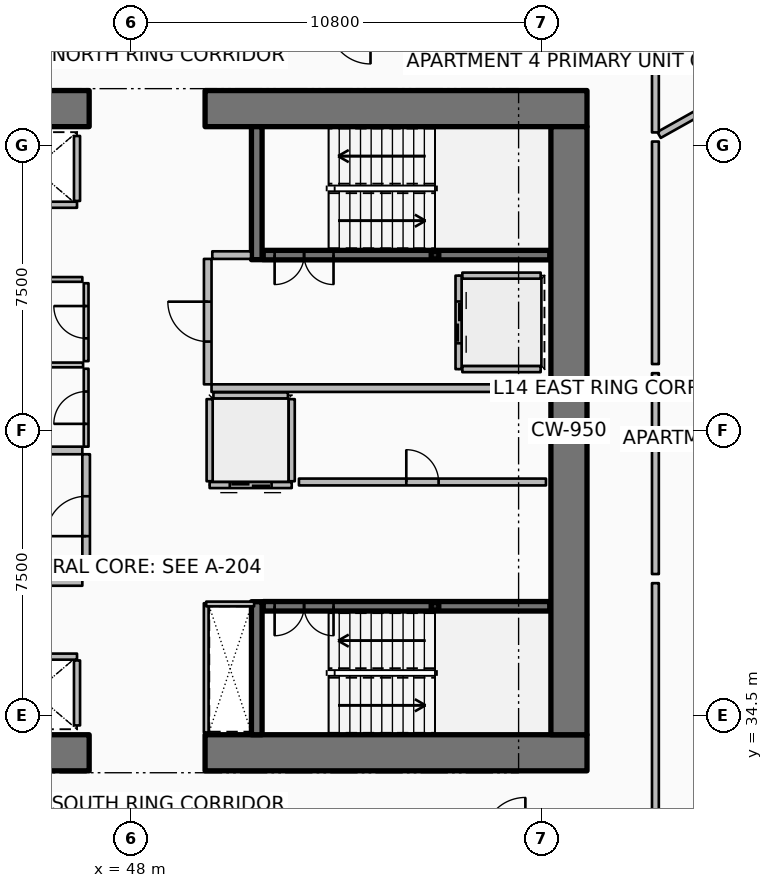
"""IFC4 building model, lengths in metres.
Left out: names, types, materials, properties, quantities, classifications, styles, units other than length and angle.
Written with IfcOpenShell. Run it as: python <this file> out.ifc"""

import sys

from ifc_helpers import new_model, si_unit, direction, frame, frame_2d, origin, origin_2d, place, context, subcontext, project, spatial, rectangle, hollow_rectangle, extrude, element, fill, save


model = new_model("IFC4")
c1 = context("Model", 3, precision=1e-05, world=origin(), true_north=direction((0.0, 1.0)))
c2 = subcontext(c1, "Body", "Model", "MODEL_VIEW")
j1 = project(units=[si_unit("LENGTHUNIT", "METRE"), si_unit("PLANEANGLEUNIT", "RADIAN")], contexts=[c1])
p1 = place(None, origin())
s1 = spatial("IfcSite", under=j1, at=p1, CompositionType="ELEMENT")
p2 = place(p1, origin())
s2 = spatial("IfcBuilding", under=s1, at=p2, CompositionType="ELEMENT")
p3 = place(p2, frame((0.0, 0.0, 60.15)))
s3 = spatial("IfcBuildingStorey", under=s2, at=p3, CompositionType="ELEMENT", Elevation=60.15)
p4 = place(p3, frame((36.85, 33.525, 0.0), z_axis=(0.0, 0.0, 1.0), x_axis=(1.0, 0.0, 0.0)))
e1 = element("IfcWall", 1, at=p4, inside=s3, PredefinedType="SHEAR", context=c2, shape_type="SweptSolid", body=[
    extrude(rectangle(XDim=10.05, YDim=0.95, at=frame_2d((5.025, 0.0))), origin(), (0.0, 0.0, 1.0), 3.75),
])
p5 = place(p3, frame((49.95, 33.525, 0.0), z_axis=(0.0, 0.0, 1.0), x_axis=(1.0, 0.0, 0.0)))
e2 = element("IfcWall", 2, at=p5, inside=s3, PredefinedType="SHEAR", context=c2, shape_type="SweptSolid", body=[
    extrude(rectangle(XDim=10.05, YDim=0.95, at=frame_2d((5.025, 0.0))), origin(), (0.0, 0.0, 1.0), 3.75),
])
p6 = place(p3, frame((36.85, 50.475, 0.0), z_axis=(0.0, 0.0, 1.0), x_axis=(1.0, 0.0, 0.0)))
e3 = element("IfcWall", 3, at=p6, inside=s3, PredefinedType="SHEAR", context=c2, shape_type="SweptSolid", body=[
    extrude(rectangle(XDim=10.05, YDim=0.95, at=frame_2d((5.025, 0.0))), origin(), (0.0, 0.0, 1.0), 3.75),
])
p7 = place(p3, frame((49.95, 50.475, 0.0), z_axis=(0.0, 0.0, 1.0), x_axis=(1.0, 0.0, 0.0)))
e4 = element("IfcWall", 4, at=p7, inside=s3, PredefinedType="SHEAR", context=c2, shape_type="SweptSolid", body=[
    extrude(rectangle(XDim=10.05, YDim=0.95, at=frame_2d((5.025, 0.0))), origin(), (0.0, 0.0, 1.0), 3.75),
])
p8 = place(p3, frame((59.525, 34.0, 0.0), z_axis=(0.0, 0.0, 1.0), x_axis=(0.0, 1.0, 0.0)))
e5 = element("IfcWall", 5, at=p8, inside=s3, PredefinedType="SHEAR", context=c2, shape_type="SweptSolid", body=[
    extrude(rectangle(XDim=16.0, YDim=0.95, at=frame_2d((8.0, 0.0))), origin(), (0.0, 0.0, 1.0), 3.75),
])
for number, where, z_axis, x_axis in (
    (6, (51.31, 46.5, 0.0), (0.0, 0.0, 1.0), (0.0, 1.0, 0.0)),
    (7, (51.31, 34.0, 0.0), (0.0, 0.0, 1.0), (0.0, 1.0, 0.0)),
):
    element("IfcWall", number, at=place(p3, frame(where, z_axis=z_axis, x_axis=x_axis)), inside=s3, PredefinedType="SHEAR", context=c2, shape_type="SweptSolid", body=[
        extrude(rectangle(XDim=3.5, YDim=0.28, at=frame_2d((1.75, 0.0))), origin(), (0.0, 0.0, 1.0), 3.75),
    ])
for number, where, z_axis, x_axis in (
    (8, (56.0, 46.62, 0.0), (0.0, 0.0, 1.0), (1.0, 0.0, 0.0)),
    (9, (56.0, 37.38, 0.0), (0.0, 0.0, 1.0), (1.0, 0.0, 0.0)),
):
    element("IfcColumn", number, at=place(p3, frame(where, z_axis=z_axis, x_axis=x_axis)), inside=s3, PredefinedType="COLUMN", context=c2, shape_type="SweptSolid", body=[
        extrude(hollow_rectangle(XDim=0.2, YDim=0.2, WallThickness=0.01, InnerFilletRadius=0.01, OuterFilletRadius=0.02, at=origin_2d()), origin(), (0.0, 0.0, 1.0), 1.67),
    ])
p9 = place(p3, frame((51.48, 46.62, 0.0), z_axis=(0.0, 0.0, 1.0), x_axis=(1.0, 0.0, 0.0)))
e10 = element("IfcWall", 10, at=p9, inside=s3, PredefinedType="SOLIDWALL", context=c2, shape_type="SweptSolid", body=[
    extrude(rectangle(XDim=7.54, YDim=0.25, at=frame_2d((3.77, 0.0))), origin(), (0.0, 0.0, 1.0), 3.5),
])
p10 = place(p9, frame((0.3, 0.0, 0.0)))
e11 = element("IfcOpeningElement", 11, at=p10, cuts=e10, PredefinedType="OPENING", context=c2, shape_type="SweptSolid", body=[
    extrude(rectangle(XDim=1.55, YDim=2.15, at=frame_2d((0.775, 1.075))), frame((0.0, 0.135, 0.0), z_axis=(0.0, -1.0, 0.0), x_axis=(1.0, 0.0, 0.0)), (0.0, 0.0, 1.0), 0.27),
])
p11 = place(p3, frame((51.48, 37.38, 0.0), z_axis=(0.0, 0.0, 1.0), x_axis=(1.0, 0.0, 0.0)))
e12 = element("IfcWall", 12, at=p11, inside=s3, PredefinedType="SOLIDWALL", context=c2, shape_type="SweptSolid", body=[
    extrude(rectangle(XDim=7.54, YDim=0.25, at=frame_2d((3.77, 0.0))), origin(), (0.0, 0.0, 1.0), 3.5),
])
p12 = place(p11, frame((0.3, 0.0, 0.0)))
e13 = element("IfcOpeningElement", 13, at=p12, cuts=e12, PredefinedType="OPENING", context=c2, shape_type="SweptSolid", body=[
    extrude(rectangle(XDim=1.55, YDim=2.15, at=frame_2d((0.775, 1.075))), frame((0.0, 0.135, 0.0), z_axis=(0.0, -1.0, 0.0), x_axis=(1.0, 0.0, 0.0)), (0.0, 0.0, 1.0), 0.27),
])
p13 = place(p3, frame((46.58, 47.945, 0.0), z_axis=(0.0, 0.0, 1.0), x_axis=(-1.0, 0.0, 0.0)))
e14 = element("IfcWall", 14, at=p13, inside=s3, PredefinedType="PARTITIONING", context=c2, shape_type="SweptSolid", body=[
    extrude(rectangle(XDim=2.26, YDim=0.16, at=frame_2d((1.13, 0.0))), origin(), (0.0, 0.0, 1.0), 3.5),
])
p14 = place(p3, frame((46.58, 48.045, 0.0), z_axis=(0.0, 0.0, 1.0), x_axis=(0.0, 1.0, 0.0)))
e15 = element("IfcWall", 15, at=p14, inside=s3, PredefinedType="PARTITIONING", context=c2, shape_type="SweptSolid", body=[
    extrude(rectangle(XDim=1.71, YDim=0.16, at=frame_2d((0.855, 0.0))), origin(), (0.0, 0.0, 1.0), 3.5),
])
p15 = place(p3, frame((44.32, 36.055, 0.0), z_axis=(0.0, 0.0, 1.0), x_axis=(1.0, 0.0, 0.0)))
e16 = element("IfcWall", 16, at=p15, inside=s3, PredefinedType="PARTITIONING", context=c2, shape_type="SweptSolid", body=[
    extrude(rectangle(XDim=2.26, YDim=0.16, at=frame_2d((1.13, 0.0))), origin(), (0.0, 0.0, 1.0), 3.5),
])
p16 = place(p3, frame((46.58, 34.245, 0.0), z_axis=(0.0, 0.0, 1.0), x_axis=(0.0, 1.0, 0.0)))
e17 = element("IfcWall", 17, at=p16, inside=s3, PredefinedType="PARTITIONING", context=c2, shape_type="SweptSolid", body=[
    extrude(rectangle(XDim=1.71, YDim=0.16, at=frame_2d((0.855, 0.0))), origin(), (0.0, 0.0, 1.0), 3.5),
])
p17 = place(p3, frame((56.62, 46.08, 0.0), z_axis=(0.0, 0.0, 1.0), x_axis=(0.0, -1.0, 0.0)))
e18 = element("IfcWall", 18, at=p17, inside=s3, PredefinedType="PARTITIONING", context=c2, shape_type="SweptSolid", body=[
    extrude(rectangle(XDim=2.46, YDim=0.16, at=frame_2d((1.23, 0.0))), origin(), (0.0, 0.0, 1.0), 3.5),
])
p18 = place(p17, frame((0.68, 0.0, 0.0)))
e19 = element("IfcOpeningElement", 19, at=p18, cuts=e18, PredefinedType="OPENING", context=c2, shape_type="SweptSolid", body=[
    extrude(rectangle(XDim=1.1, YDim=2.1, at=frame_2d((0.55, 1.05))), frame((0.0, 0.09, 0.0), z_axis=(0.0, -1.0, 0.0), x_axis=(1.0, 0.0, 0.0)), (0.0, 0.0, 1.0), 0.18),
])
for number, where, z_axis, x_axis in (
    (20, (56.72, 46.08, 0.0), (0.0, 0.0, 1.0), (1.0, 0.0, 0.0)),
    (21, (56.72, 43.62, 0.0), (0.0, 0.0, 1.0), (1.0, 0.0, 0.0)),
):
    element("IfcWall", number, at=place(p3, frame(where, z_axis=z_axis, x_axis=x_axis)), inside=s3, PredefinedType="PARTITIONING", context=c2, shape_type="SweptSolid", body=[
        extrude(rectangle(XDim=2.06, YDim=0.16, at=frame_2d((1.03, 0.0))), origin(), (0.0, 0.0, 1.0), 3.5),
    ])
p19 = place(p3, frame((52.23, 40.57, 0.0), z_axis=(0.0, 0.0, 1.0), x_axis=(-1.0, 0.0, 0.0)))
e22 = element("IfcWall", 22, at=p19, inside=s3, PredefinedType="PARTITIONING", context=c2, shape_type="SweptSolid", body=[
    extrude(rectangle(XDim=2.16, YDim=0.16, at=frame_2d((1.08, 0.0))), origin(), (0.0, 0.0, 1.0), 3.5),
])
p20 = place(p19, frame((0.53, 0.0, 0.0)))
e23 = element("IfcOpeningElement", 23, at=p20, cuts=e22, PredefinedType="OPENING", context=c2, shape_type="SweptSolid", body=[
    extrude(rectangle(XDim=1.1, YDim=2.1, at=frame_2d((0.55, 1.05))), frame((0.0, 0.09, 0.0), z_axis=(0.0, -1.0, 0.0), x_axis=(1.0, 0.0, 0.0)), (0.0, 0.0, 1.0), 0.18),
])
for number, where, z_axis, x_axis in (
    (24, (52.23, 40.67, 0.0), (0.0, 0.0, 1.0), (0.0, 1.0, 0.0)),
    (25, (50.07, 40.67, 0.0), (0.0, 0.0, 1.0), (0.0, 1.0, 0.0)),
):
    element("IfcWall", number, at=place(p3, frame(where, z_axis=z_axis, x_axis=x_axis)), inside=s3, PredefinedType="PARTITIONING", context=c2, shape_type="SweptSolid", body=[
        extrude(rectangle(XDim=2.16, YDim=0.16, at=frame_2d((1.08, 0.0))), origin(), (0.0, 0.0, 1.0), 3.5),
    ])
p21 = place(p3, frame((50.17, 42.93, 0.0), z_axis=(0.0, 0.0, 1.0), x_axis=(1.0, 0.0, 0.0)))
e26 = element("IfcWall", 26, at=p21, inside=s3, PredefinedType="PARTITIONING", context=c2, shape_type="SweptSolid", body=[
    extrude(rectangle(XDim=1.96, YDim=0.16, at=frame_2d((0.98, 0.0))), origin(), (0.0, 0.0, 1.0), 3.5),
])
p22 = place(p3, frame((52.42, 40.65, 0.0), z_axis=(0.0, 0.0, 1.0), x_axis=(1.0, 0.0, 0.0)))
e27 = element("IfcWall", 27, at=p22, inside=s3, PredefinedType="PARTITIONING", context=c2, shape_type="SweptSolid", body=[
    extrude(rectangle(XDim=6.5, YDim=0.18, at=frame_2d((3.25, 0.0))), origin(), (0.0, 0.0, 1.0), 3.5),
])
p23 = place(p22, frame((2.825, 0.0, 0.0)))
e28 = element("IfcOpeningElement", 28, at=p23, cuts=e27, PredefinedType="OPENING", context=c2, shape_type="SweptSolid", body=[
    extrude(rectangle(XDim=0.85, YDim=2.06, at=frame_2d((0.425, 1.03))), frame((0.0, 0.1, 0.0), z_axis=(0.0, -1.0, 0.0), x_axis=(1.0, 0.0, 0.0)), (0.0, 0.0, 1.0), 0.2),
])
p24 = place(p3, frame((41.35, 38.02, 0.0), z_axis=(0.0, 0.0, 1.0), x_axis=(1.0, 0.0, 0.0)))
e29 = element("IfcWall", 29, at=p24, inside=s3, PredefinedType="PARTITIONING", context=c2, shape_type="SweptSolid", body=[
    extrude(rectangle(XDim=5.37, YDim=0.2, at=frame_2d((2.685, 0.0))), origin(), (0.0, 0.0, 1.0), 3.5),
])
p25 = place(p3, frame((43.92, 41.48, 0.0), z_axis=(0.0, 0.0, 1.0), x_axis=(1.0, 0.0, 0.0)))
e30 = element("IfcWall", 30, at=p25, inside=s3, PredefinedType="PARTITIONING", context=c2, shape_type="SweptSolid", body=[
    extrude(rectangle(XDim=2.8, YDim=0.2, at=frame_2d((1.4, 0.0))), origin(), (0.0, 0.0, 1.0), 3.5),
])
p26 = place(p3, frame((46.82, 38.12, 0.0), z_axis=(0.0, 0.0, 1.0), x_axis=(0.0, 1.0, 0.0)))
e31 = element("IfcWall", 31, at=p26, inside=s3, PredefinedType="PARTITIONING", context=c2, shape_type="SweptSolid", body=[
    extrude(rectangle(XDim=3.26, YDim=0.2, at=frame_2d((1.63, 0.0))), origin(), (0.0, 0.0, 1.0), 3.5),
])
p27 = place(p26, frame((1.105, 0.0, 0.0)))
e32 = element("IfcOpeningElement", 32, at=p27, cuts=e31, PredefinedType="OPENING", context=c2, shape_type="SweptSolid", body=[
    extrude(rectangle(XDim=1.05, YDim=2.1, at=frame_2d((0.525, 1.05))), frame((0.0, 0.11, 0.0), z_axis=(0.0, -1.0, 0.0), x_axis=(1.0, 0.0, 0.0)), (0.0, 0.0, 1.0), 0.22),
])
p28 = place(p3, frame((50.12, 43.12, 0.0), z_axis=(0.0, 0.0, 1.0), x_axis=(1.0, 0.0, 0.0)))
e33 = element("IfcWall", 33, at=p28, inside=s3, PredefinedType="PARTITIONING", context=c2, shape_type="SweptSolid", body=[
    extrude(rectangle(XDim=8.88, YDim=0.2, at=frame_2d((4.44, 0.0))), origin(), (0.0, 0.0, 1.0), 3.5),
])
p29 = place(p3, frame((50.14, 46.62, 0.0), z_axis=(0.0, 0.0, 1.0), x_axis=(1.0, 0.0, 0.0)))
e34 = element("IfcWall", 34, at=p29, inside=s3, PredefinedType="PARTITIONING", context=c2, shape_type="SweptSolid", body=[
    extrude(rectangle(XDim=1.02, YDim=0.2, at=frame_2d((0.51, 0.0))), origin(), (0.0, 0.0, 1.0), 3.5),
])
p30 = place(p3, frame((50.02, 43.22, 0.0), z_axis=(0.0, 0.0, 1.0), x_axis=(0.0, 1.0, 0.0)))
e35 = element("IfcWall", 35, at=p30, inside=s3, PredefinedType="PARTITIONING", context=c2, shape_type="SweptSolid", body=[
    extrude(rectangle(XDim=3.3, YDim=0.2, at=frame_2d((1.65, 0.0))), origin(), (0.0, 0.0, 1.0), 3.5),
])
p31 = place(p30, frame((1.125, 0.0, 0.0)))
e36 = element("IfcOpeningElement", 36, at=p31, cuts=e35, PredefinedType="OPENING", context=c2, shape_type="SweptSolid", body=[
    extrude(rectangle(XDim=1.05, YDim=2.1, at=frame_2d((0.525, 1.05))), frame((0.0, 0.11, 0.0), z_axis=(0.0, -1.0, 0.0), x_axis=(1.0, 0.0, 0.0)), (0.0, 0.0, 1.0), 0.22),
])
p32 = place(p3, frame((41.36, 45.98, 0.0), z_axis=(0.0, 0.0, 1.0), x_axis=(1.0, 0.0, 0.0)))
e37 = element("IfcWall", 37, at=p32, inside=s3, PredefinedType="PARTITIONING", context=c2, shape_type="SweptSolid", body=[
    extrude(rectangle(XDim=5.36, YDim=0.125, at=frame_2d((2.68, 0.0))), origin(), (0.0, 0.0, 1.0), 2.94),
])
p33 = place(p3, frame((49.98, 34.06, 0.0), z_axis=(0.0, 0.0, 1.0), x_axis=(0.0, 1.0, 0.0)))
e38 = element("IfcWall", 38, at=p33, inside=s3, PredefinedType="PARTITIONING", context=c2, shape_type="SweptSolid", body=[
    extrude(rectangle(XDim=3.4, YDim=0.125, at=frame_2d((1.7, 0.0))), origin(), (0.0, 0.0, 1.0), 2.94),
])
p34 = place(p3, frame((49.98, 37.44, 0.0), z_axis=(0.0, 0.0, 1.0), x_axis=(1.0, 0.0, 0.0)))
e39 = element("IfcWall", 39, at=p34, inside=s3, PredefinedType="PARTITIONING", context=c2, shape_type="SweptSolid", body=[
    extrude(rectangle(XDim=1.26, YDim=0.125, at=frame_2d((0.63, 0.0))), origin(), (0.0, 0.0, 1.0), 2.94),
])
p35 = place(p3, frame((44.03, 43.73, 0.0), z_axis=(0.0, 0.0, 1.0), x_axis=(1.0, 0.0, 0.0)))
e40 = element("IfcWall", 40, at=p35, inside=s3, PredefinedType="PARTITIONING", context=c2, shape_type="SweptSolid", body=[
    extrude(rectangle(XDim=2.71, YDim=0.125, at=frame_2d((1.355, 0.0))), origin(), (0.0, 0.0, 1.0), 2.94),
])
p36 = place(p3, frame((46.82, 41.58, 0.0), z_axis=(0.0, 0.0, 1.0), x_axis=(0.0, 1.0, 0.0)))
e41 = element("IfcWall", 41, at=p36, inside=s3, PredefinedType="PARTITIONING", context=c2, shape_type="SweptSolid", body=[
    extrude(rectangle(XDim=2.05, YDim=0.125, at=frame_2d((1.025, 0.0))), origin(), (0.0, 0.0, 1.0), 2.94),
])
p37 = place(p36, frame((0.6, 0.0, 0.0)))
e42 = element("IfcOpeningElement", 42, at=p37, cuts=e41, PredefinedType="OPENING", context=c2, shape_type="SweptSolid", body=[
    extrude(rectangle(XDim=0.85, YDim=2.06, at=frame_2d((0.425, 1.03))), frame((0.0, 0.073, 0.0), z_axis=(0.0, -1.0, 0.0), x_axis=(1.0, 0.0, 0.0)), (0.0, 0.0, 1.0), 0.145),
])
p38 = place(p3, frame((46.82, 43.83, 0.0), z_axis=(0.0, 0.0, 1.0), x_axis=(0.0, 1.0, 0.0)))
e43 = element("IfcWall", 43, at=p38, inside=s3, PredefinedType="PARTITIONING", context=c2, shape_type="SweptSolid", body=[
    extrude(rectangle(XDim=2.05, YDim=0.125, at=frame_2d((1.025, 0.0))), origin(), (0.0, 0.0, 1.0), 2.94),
])
p39 = place(p38, frame((0.6, 0.0, 0.0)))
e44 = element("IfcOpeningElement", 44, at=p39, cuts=e43, PredefinedType="OPENING", context=c2, shape_type="SweptSolid", body=[
    extrude(rectangle(XDim=0.85, YDim=2.06, at=frame_2d((0.425, 1.03))), frame((0.0, 0.073, 0.0), z_axis=(0.0, -1.0, 0.0), x_axis=(1.0, 0.0, 0.0)), (0.0, 0.0, 1.0), 0.145),
])
p40 = place(p3, frame((61.896, 49.782, 0.0), z_axis=(0.0, 0.0, 1.0), x_axis=(0.872493215695, 0.488626225828, 0.0)))
e45 = element("IfcWall", 45, at=p40, inside=s3, PredefinedType="PARTITIONING", context=c2, shape_type="SweptSolid", body=[
    extrude(rectangle(XDim=15.612, YDim=0.18, at=frame_2d((7.806, 0.0))), origin(), (0.0, 0.0, 1.0), 2.867),
])
p41 = place(p3, frame((61.8, 31.37, 0.0), z_axis=(0.0, 0.0, 1.0), x_axis=(0.0, 1.0, 0.0)))
e46 = element("IfcWall", 46, at=p41, inside=s3, PredefinedType="PARTITIONING", context=c2, shape_type="SweptSolid", body=[
    extrude(rectangle(XDim=6.618, YDim=0.18, at=frame_2d((3.309, 0.0))), origin(), (0.0, 0.0, 1.0), 2.867),
])
p42 = place(p3, frame((61.8, 38.228, 0.0), z_axis=(0.0, 0.0, 1.0), x_axis=(0.0, 1.0, 0.0)))
e47 = element("IfcWall", 47, at=p42, inside=s3, PredefinedType="PARTITIONING", context=c2, shape_type="SweptSolid", body=[
    extrude(rectangle(XDim=5.285, YDim=0.18, at=frame_2d((2.643, 0.0))), origin(), (0.0, 0.0, 1.0), 2.867),
])
p43 = place(p3, frame((61.8, 43.753, 0.0), z_axis=(0.0, 0.0, 1.0), x_axis=(0.0, 1.0, 0.0)))
e48 = element("IfcWall", 48, at=p43, inside=s3, PredefinedType="PARTITIONING", context=c2, shape_type="SweptSolid", body=[
    extrude(rectangle(XDim=5.855, YDim=0.18, at=frame_2d((2.927, 0.0))), origin(), (0.0, 0.0, 1.0), 2.867),
])
p44 = place(p3, frame((61.8, 49.848, 0.0), z_axis=(0.0, 0.0, 1.0), x_axis=(0.0, 1.0, 0.0)))
e49 = element("IfcWall", 49, at=p44, inside=s3, PredefinedType="PARTITIONING", context=c2, shape_type="SweptSolid", body=[
    extrude(rectangle(XDim=2.781, YDim=0.18, at=frame_2d((1.391, 0.0))), origin(), (0.0, 0.0, 1.0), 2.867),
])
p45 = place(p10, origin())
e50 = element("IfcDoor", 50, at=p45, inside=s3, OperationType="DOUBLE_DOOR_SINGLE_SWING", PredefinedType="DOOR", context=c2, shape_type="SweptSolid", body=[
    extrude(rectangle(XDim=1.55, YDim=2.15, at=frame_2d((0.775, 1.075))), frame((0.0, 0.025, 0.0), z_axis=(0.0, -1.0, 0.0), x_axis=(1.0, 0.0, 0.0)), (0.0, 0.0, 1.0), 0.05),
])
fill(e11, e50)
p46 = place(p12, origin())
e51 = element("IfcDoor", 51, at=p46, inside=s3, OperationType="DOUBLE_DOOR_SINGLE_SWING", PredefinedType="DOOR", context=c2, shape_type="SweptSolid", body=[
    extrude(rectangle(XDim=1.55, YDim=2.15, at=frame_2d((0.775, 1.075))), frame((0.0, 0.025, 0.0), z_axis=(0.0, -1.0, 0.0), x_axis=(1.0, 0.0, 0.0)), (0.0, 0.0, 1.0), 0.05),
])
fill(e13, e51)
p47 = place(p18, origin())
e52 = element("IfcDoor", 52, at=p47, inside=s3, OperationType="DOUBLE_DOOR_SLIDING", PredefinedType="DOOR", context=c2, shape_type="SweptSolid", body=[
    extrude(rectangle(XDim=1.1, YDim=2.1, at=frame_2d((0.55, 1.05))), frame((0.0, 0.025, 0.0), z_axis=(0.0, -1.0, 0.0), x_axis=(1.0, 0.0, 0.0)), (0.0, 0.0, 1.0), 0.05),
])
fill(e19, e52)
p48 = place(p20, origin())
e53 = element("IfcDoor", 53, at=p48, inside=s3, OperationType="DOUBLE_DOOR_SLIDING", PredefinedType="DOOR", context=c2, shape_type="SweptSolid", body=[
    extrude(rectangle(XDim=1.1, YDim=2.1, at=frame_2d((0.55, 1.05))), frame((0.0, 0.025, 0.0), z_axis=(0.0, -1.0, 0.0), x_axis=(1.0, 0.0, 0.0)), (0.0, 0.0, 1.0), 0.05),
])
fill(e23, e53)
p49 = place(p23, origin())
e54 = element("IfcDoor", 54, at=p49, inside=s3, OperationType="SINGLE_SWING_LEFT", PredefinedType="DOOR", context=c2, shape_type="SweptSolid", body=[
    extrude(rectangle(XDim=0.85, YDim=2.06, at=frame_2d((0.425, 1.03))), frame((0.0, 0.025, 0.0), z_axis=(0.0, -1.0, 0.0), x_axis=(1.0, 0.0, 0.0)), (0.0, 0.0, 1.0), 0.05),
])
fill(e28, e54)
p50 = place(p27, origin())
e55 = element("IfcDoor", 55, at=p50, inside=s3, OperationType="SINGLE_SWING_LEFT", PredefinedType="DOOR", context=c2, shape_type="SweptSolid", body=[
    extrude(rectangle(XDim=1.05, YDim=2.1, at=frame_2d((0.525, 1.05))), frame((0.0, 0.025, 0.0), z_axis=(0.0, -1.0, 0.0), x_axis=(1.0, 0.0, 0.0)), (0.0, 0.0, 1.0), 0.05),
])
fill(e32, e55)
p51 = place(p31, origin())
e56 = element("IfcDoor", 56, at=p51, inside=s3, OperationType="SINGLE_SWING_RIGHT", PredefinedType="DOOR", context=c2, shape_type="SweptSolid", body=[
    extrude(rectangle(XDim=1.05, YDim=2.1, at=frame_2d((0.525, 1.05))), frame((0.0, 0.025, 0.0), z_axis=(0.0, -1.0, 0.0), x_axis=(1.0, 0.0, 0.0)), (0.0, 0.0, 1.0), 0.05),
])
fill(e36, e56)
p52 = place(p37, origin())
e57 = element("IfcDoor", 57, at=p52, inside=s3, OperationType="SINGLE_SWING_LEFT", PredefinedType="DOOR", context=c2, shape_type="SweptSolid", body=[
    extrude(rectangle(XDim=0.85, YDim=2.06, at=frame_2d((0.425, 1.03))), frame((0.0, 0.025, 0.0), z_axis=(0.0, -1.0, 0.0), x_axis=(1.0, 0.0, 0.0)), (0.0, 0.0, 1.0), 0.05),
])
fill(e42, e57)
p53 = place(p39, origin())
e58 = element("IfcDoor", 58, at=p53, inside=s3, OperationType="SINGLE_SWING_RIGHT", PredefinedType="DOOR", context=c2, shape_type="SweptSolid", body=[
    extrude(rectangle(XDim=0.85, YDim=2.06, at=frame_2d((0.425, 1.03))), frame((0.0, 0.025, 0.0), z_axis=(0.0, -1.0, 0.0), x_axis=(1.0, 0.0, 0.0)), (0.0, 0.0, 1.0), 0.05),
])
fill(e44, e58)
save(model, sys.argv[1])
